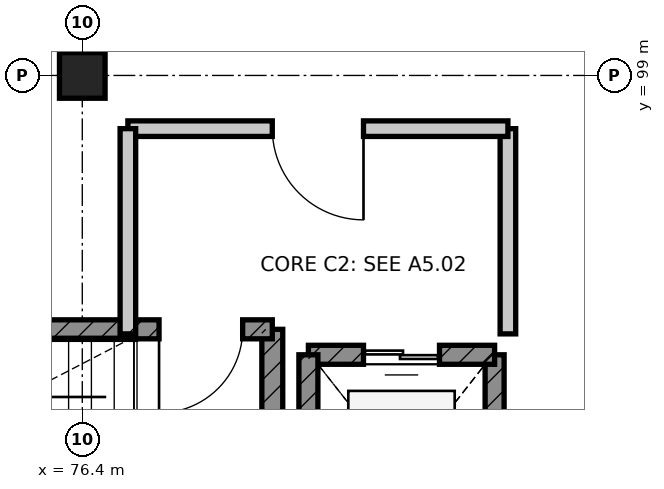
"""IFC4 building model, lengths in metres.
Left out: names, types, materials, properties, quantities, classifications, styles, units other than length and angle.
Written with IfcOpenShell. Run it as: python <this file> out.ifc"""

import sys

from ifc_helpers import new_model, si_unit, direction, frame, frame_2d, origin, origin_2d, place, context, subcontext, project, spatial, rectangle, extrude, element, fill, save


model = new_model("IFC4")
c1 = context("Model", 3, precision=1e-05, world=origin(), true_north=direction((0.0, 1.0)))
c2 = subcontext(c1, "Body", "Model", "MODEL_VIEW")
j1 = project(units=[si_unit("LENGTHUNIT", "METRE"), si_unit("PLANEANGLEUNIT", "RADIAN")], contexts=[c1])
p1 = place(None, origin())
s1 = spatial("IfcSite", under=j1, at=p1, CompositionType="ELEMENT")
p2 = place(p1, origin())
s2 = spatial("IfcBuilding", under=s1, at=p2, CompositionType="ELEMENT")
p3 = place(p2, frame((0.0, 0.0, 30.0)))
s3 = spatial("IfcBuildingStorey", under=s2, at=p3, CompositionType="ELEMENT", Elevation=30.0)
p4 = place(p3, frame((76.4, 99.0, 0.0), z_axis=(0.0, 0.0, 1.0), x_axis=(1.0, 0.0, 0.0)))
e1 = element("IfcColumn", 1, at=p4, inside=s3, PredefinedType="COLUMN", context=c2, shape_type="SweptSolid", body=[
    extrude(rectangle(XDim=0.6, YDim=0.6, at=origin_2d()), origin(), (0.0, 0.0, 1.0), 3.6),
])
p5 = place(p3, frame((78.9, 92.1, 0.0), z_axis=(0.0, 0.0, 1.0), x_axis=(0.0, 1.0, 0.0)))
e2 = element("IfcWall", 2, at=p5, inside=s3, PredefinedType="SHEAR", context=c2, shape_type="SweptSolid", body=[
    extrude(rectangle(XDim=3.56, YDim=0.275, at=frame_2d((1.78, 0.0))), origin(), (0.0, 0.0, 1.0), 3.36),
])
p6 = place(p3, frame((78.9, 95.66, 0.0), z_axis=(0.0, 0.0, 1.0), x_axis=(-1.0, 0.0, 0.0)))
e3 = element("IfcWall", 3, at=p6, inside=s3, PredefinedType="SHEAR", context=c2, shape_type="SweptSolid", body=[
    extrude(rectangle(XDim=8.4, YDim=0.25, at=frame_2d((4.2, 0.0))), origin(), (0.0, 0.0, 1.0), 3.36),
])
p7 = place(p6, frame((0.39, 0.0, 0.0)))
e4 = element("IfcOpeningElement", 4, at=p7, cuts=e3, PredefinedType="OPENING", context=c2, shape_type="SweptSolid", body=[
    extrude(rectangle(XDim=1.1, YDim=2.1, at=frame_2d((0.55, 1.05))), frame((0.0, 0.135, 0.0), z_axis=(0.0, -1.0, 0.0), x_axis=(1.0, 0.0, 0.0)), (0.0, 0.0, 1.0), 0.27),
])
p8 = place(p3, frame((81.825, 92.275, 0.0), z_axis=(0.0, 0.0, 1.0), x_axis=(0.0, 1.0, 0.0)))
e5 = element("IfcWall", 5, at=p8, inside=s3, PredefinedType="SHEAR", context=c2, shape_type="SweptSolid", body=[
    extrude(rectangle(XDim=3.05, YDim=0.25, at=frame_2d((1.525, 0.0))), origin(), (0.0, 0.0, 1.0), 3.36),
])
p9 = place(p3, frame((81.825, 95.325, 0.0), z_axis=(0.0, 0.0, 1.0), x_axis=(-1.0, 0.0, 0.0)))
e6 = element("IfcWall", 6, at=p9, inside=s3, PredefinedType="SHEAR", context=c2, shape_type="SweptSolid", body=[
    extrude(rectangle(XDim=2.45, YDim=0.25, at=frame_2d((1.225, 0.0))), origin(), (0.0, 0.0, 1.0), 3.36),
])
p10 = place(p9, frame((0.725, 0.0, 0.0)))
e7 = element("IfcOpeningElement", 7, at=p10, cuts=e6, PredefinedType="OPENING", context=c2, shape_type="SweptSolid", body=[
    extrude(rectangle(XDim=1.0, YDim=2.15, at=frame_2d((0.5, 1.075))), frame((0.0, 0.135, 0.0), z_axis=(0.0, -1.0, 0.0), x_axis=(1.0, 0.0, 0.0)), (0.0, 0.0, 1.0), 0.27),
])
p11 = place(p3, frame((79.375, 95.325, 0.0), z_axis=(0.0, 0.0, 1.0), x_axis=(0.0, -1.0, 0.0)))
e8 = element("IfcWall", 8, at=p11, inside=s3, PredefinedType="SHEAR", context=c2, shape_type="SweptSolid", body=[
    extrude(rectangle(XDim=3.05, YDim=0.25, at=frame_2d((1.525, 0.0))), origin(), (0.0, 0.0, 1.0), 3.36),
])
p12 = place(p3, frame((82.0, 95.6, 0.0), z_axis=(0.0, 0.0, 1.0), x_axis=(0.0, 1.0, 0.0)))
e9 = element("IfcWall", 9, at=p12, inside=s3, PredefinedType="PARTITIONING", context=c2, shape_type="SweptSolid", body=[
    extrude(rectangle(XDim=2.7, YDim=0.205, at=frame_2d((1.35, 0.0))), origin(), (0.0, 0.0, 1.0), 3.36),
])
p13 = place(p3, frame((82.0, 98.3, 0.0), z_axis=(0.0, 0.0, 1.0), x_axis=(-1.0, 0.0, 0.0)))
e10 = element("IfcWall", 10, at=p13, inside=s3, PredefinedType="PARTITIONING", context=c2, shape_type="SweptSolid", body=[
    extrude(rectangle(XDim=5.0, YDim=0.205, at=frame_2d((2.5, 0.0))), origin(), (0.0, 0.0, 1.0), 3.36),
])
p14 = place(p13, frame((1.9, 0.0, 0.0)))
e11 = element("IfcOpeningElement", 11, at=p14, cuts=e10, PredefinedType="OPENING", context=c2, shape_type="SweptSolid", body=[
    extrude(rectangle(XDim=1.2, YDim=2.1, at=frame_2d((0.6, 1.05))), frame((0.0, 0.113, 0.0), z_axis=(0.0, -1.0, 0.0), x_axis=(1.0, 0.0, 0.0)), (0.0, 0.0, 1.0), 0.225),
])
p15 = place(p3, frame((77.0, 98.3, 0.0), z_axis=(0.0, 0.0, 1.0), x_axis=(0.0, -1.0, 0.0)))
e12 = element("IfcWall", 12, at=p15, inside=s3, PredefinedType="PARTITIONING", context=c2, shape_type="SweptSolid", body=[
    extrude(rectangle(XDim=2.7, YDim=0.205, at=frame_2d((1.35, 0.0))), origin(), (0.0, 0.0, 1.0), 3.36),
])
p16 = place(p7, origin())
e13 = element("IfcDoor", 13, at=p16, inside=s3, OperationType="SINGLE_SWING_RIGHT", PredefinedType="DOOR", context=c2, shape_type="SweptSolid", body=[
    extrude(rectangle(XDim=1.1, YDim=2.1, at=frame_2d((0.55, 1.05))), frame((0.0, 0.025, 0.0), z_axis=(0.0, -1.0, 0.0), x_axis=(1.0, 0.0, 0.0)), (0.0, 0.0, 1.0), 0.05),
])
fill(e4, e13)
p17 = place(p10, origin())
e14 = element("IfcDoor", 14, at=p17, inside=s3, OperationType="DOUBLE_DOOR_SLIDING", PredefinedType="DOOR", context=c2, shape_type="SweptSolid", body=[
    extrude(rectangle(XDim=1.0, YDim=2.15, at=frame_2d((0.5, 1.075))), frame((0.0, 0.025, 0.0), z_axis=(0.0, -1.0, 0.0), x_axis=(1.0, 0.0, 0.0)), (0.0, 0.0, 1.0), 0.05),
])
fill(e7, e14)
p18 = place(p14, origin())
e15 = element("IfcDoor", 15, at=p18, inside=s3, OperationType="SINGLE_SWING_LEFT", PredefinedType="DOOR", context=c2, shape_type="SweptSolid", body=[
    extrude(rectangle(XDim=1.2, YDim=2.1, at=frame_2d((0.6, 1.05))), frame((0.0, 0.025, 0.0), z_axis=(0.0, -1.0, 0.0), x_axis=(1.0, 0.0, 0.0)), (0.0, 0.0, 1.0), 0.05),
])
fill(e11, e15)
save(model, sys.argv[1])
